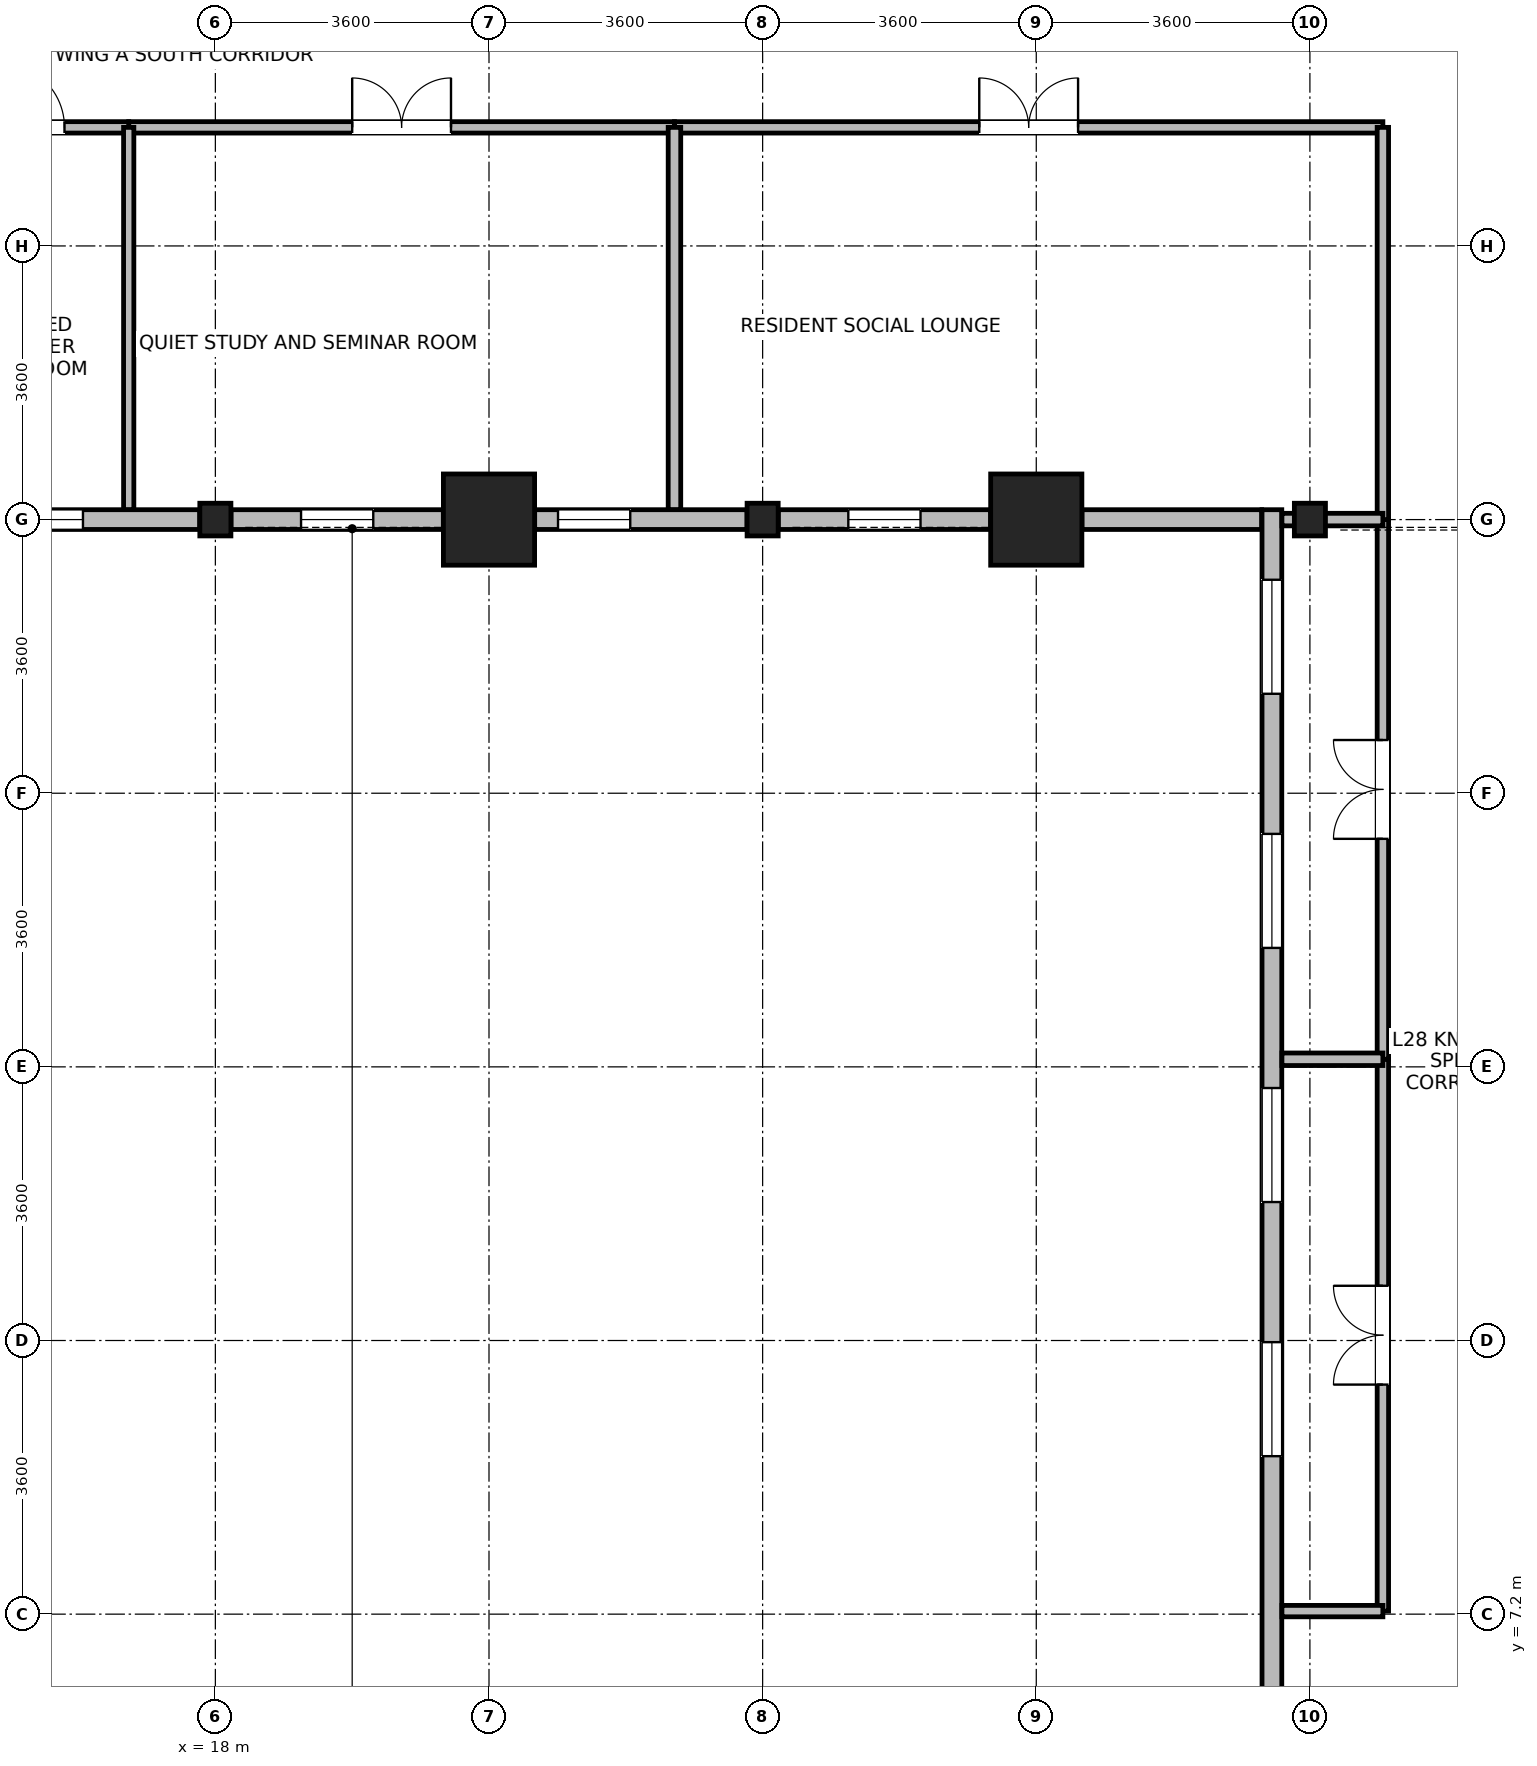
"""IFC4 building model, lengths in metres.
Left out: names, types, materials, properties, quantities, classifications, styles, units other than length and angle.
Written with IfcOpenShell. Run it as: python <this file> out.ifc"""

import sys

from ifc_helpers import new_model, si_unit, direction, frame, frame_2d, origin, origin_2d, place, context, subcontext, project, spatial, rectangle, i_section, extrude, source, transform, mapped, element, fill, save


model = new_model("IFC4")
c1 = context("Model", 3, precision=1e-05, world=origin(), true_north=direction((0.0, 1.0)))
c2 = subcontext(c1, "Body", "Model", "MODEL_VIEW")
j1 = project(units=[si_unit("LENGTHUNIT", "METRE"), si_unit("PLANEANGLEUNIT", "RADIAN")], contexts=[c1])
p1 = place(None, origin())
s1 = spatial("IfcSite", under=j1, at=p1, CompositionType="ELEMENT")
p2 = place(p1, origin())
s2 = spatial("IfcBuilding", under=s1, at=p2, CompositionType="ELEMENT")
p3 = place(p2, frame((0.0, 0.0, 111.9)))
s3 = spatial("IfcBuildingStorey", under=s2, at=p3, CompositionType="ELEMENT", Elevation=111.9)
m1 = source(origin(), c2, "Body", "SweptSolid", [
    extrude(rectangle(XDim=1.2, YDim=1.2, at=origin_2d()), origin(), (0.0, 0.0, 1.0), 3.7),
])
for number, where, z_axis, x_axis in (
    (1, (21.6, 21.6, 0.0), (0.0, 0.0, 1.0), (1.0, 0.0, 0.0)),
    (2, (28.8, 21.6, 0.0), (0.0, 0.0, 1.0), (1.0, 0.0, 0.0)),
):
    element("IfcColumn", number, at=place(p3, frame(where, z_axis=z_axis, x_axis=x_axis)), inside=s3, PredefinedType="COLUMN", context=c2, shape_type="MappedRepresentation", body=[
        mapped(m1, transform((0.0, 0.0, 0.0), x_axis=(1.0, 0.0, 0.0), y_axis=(0.0, 1.0, 0.0), z_axis=(0.0, 0.0, 1.0), scale=1.0)),
    ])
m2 = source(origin(), c2, "Body", "SweptSolid", [
    extrude(i_section(OverallWidth=0.409, OverallDepth=0.43, WebThickness=0.024, FlangeThickness=0.033, FilletRadius=0.015, at=origin_2d()), origin(), (0.0, 0.0, 1.0), 3.7),
])
for number, where, z_axis, x_axis in (
    (3, (18.0, 21.6, 0.0), (0.0, 0.0, 1.0), (1.0, 0.0, 0.0)),
    (4, (25.2, 21.6, 0.0), (0.0, 0.0, 1.0), (1.0, 0.0, 0.0)),
    (5, (32.4, 21.6, 0.0), (0.0, 0.0, 1.0), (1.0, 0.0, 0.0)),
):
    element("IfcColumn", number, at=place(p3, frame(where, z_axis=z_axis, x_axis=x_axis)), inside=s3, PredefinedType="COLUMN", context=c2, shape_type="MappedRepresentation", body=[
        mapped(m2, transform((0.0, 0.0, 0.0), x_axis=(1.0, 0.0, 0.0), y_axis=(0.0, 1.0, 0.0), z_axis=(0.0, 0.0, 1.0), scale=1.0)),
    ])
p4 = place(p3, frame((17.794, 21.6, 0.0), z_axis=(0.0, 0.0, 1.0), x_axis=(-1.0, 0.0, 0.0)))
e6 = element("IfcWall", 6, at=p4, inside=s3, PredefinedType="STANDARD", context=c2, shape_type="SweptSolid", body=[
    extrude(rectangle(XDim=2.793, YDim=0.26, at=frame_2d((1.397, 0.0))), origin(), (0.0, 0.0, 1.0), 2.98),
])
p5 = place(p4, frame((1.536, 0.0, 0.85)))
e7 = element("IfcOpeningElement", 7, at=p5, cuts=e6, PredefinedType="OPENING", context=c2, shape_type="SweptSolid", body=[
    extrude(rectangle(XDim=0.95, YDim=1.75, at=frame_2d((0.475, 0.875))), frame((0.0, 0.14, 0.0), z_axis=(0.0, -1.0, 0.0), x_axis=(1.0, 0.0, 0.0)), (0.0, 0.0, 1.0), 0.28),
])
p6 = place(p3, frame((20.999, 21.6, 0.0), z_axis=(0.0, 0.0, 1.0), x_axis=(-1.0, 0.0, 0.0)))
e8 = element("IfcWall", 8, at=p6, inside=s3, PredefinedType="STANDARD", context=c2, shape_type="SweptSolid", body=[
    extrude(rectangle(XDim=2.793, YDim=0.26, at=frame_2d((1.397, 0.0))), origin(), (0.0, 0.0, 1.0), 2.98),
])
p7 = place(p6, frame((0.922, 0.0, 0.85)))
e9 = element("IfcOpeningElement", 9, at=p7, cuts=e8, PredefinedType="OPENING", context=c2, shape_type="SweptSolid", body=[
    extrude(rectangle(XDim=0.95, YDim=1.75, at=frame_2d((0.475, 0.875))), frame((0.0, 0.14, 0.0), z_axis=(0.0, -1.0, 0.0), x_axis=(1.0, 0.0, 0.0)), (0.0, 0.0, 1.0), 0.28),
])
p8 = place(p3, frame((24.994, 21.6, 0.0), z_axis=(0.0, 0.0, 1.0), x_axis=(-1.0, 0.0, 0.0)))
e10 = element("IfcWall", 10, at=p8, inside=s3, PredefinedType="STANDARD", context=c2, shape_type="SweptSolid", body=[
    extrude(rectangle(XDim=2.793, YDim=0.26, at=frame_2d((1.397, 0.0))), origin(), (0.0, 0.0, 1.0), 2.98),
])
p9 = place(p8, frame((1.536, 0.0, 0.85)))
e11 = element("IfcOpeningElement", 11, at=p9, cuts=e10, PredefinedType="OPENING", context=c2, shape_type="SweptSolid", body=[
    extrude(rectangle(XDim=0.95, YDim=1.75, at=frame_2d((0.475, 0.875))), frame((0.0, 0.14, 0.0), z_axis=(0.0, -1.0, 0.0), x_axis=(1.0, 0.0, 0.0)), (0.0, 0.0, 1.0), 0.28),
])
p10 = place(p3, frame((28.199, 21.6, 0.0), z_axis=(0.0, 0.0, 1.0), x_axis=(-1.0, 0.0, 0.0)))
e12 = element("IfcWall", 12, at=p10, inside=s3, PredefinedType="STANDARD", context=c2, shape_type="SweptSolid", body=[
    extrude(rectangle(XDim=2.793, YDim=0.26, at=frame_2d((1.397, 0.0))), origin(), (0.0, 0.0, 1.0), 2.98),
])
p11 = place(p10, frame((0.922, 0.0, 0.85)))
e13 = element("IfcOpeningElement", 13, at=p11, cuts=e12, PredefinedType="OPENING", context=c2, shape_type="SweptSolid", body=[
    extrude(rectangle(XDim=0.95, YDim=1.75, at=frame_2d((0.475, 0.875))), frame((0.0, 0.14, 0.0), z_axis=(0.0, -1.0, 0.0), x_axis=(1.0, 0.0, 0.0)), (0.0, 0.0, 1.0), 0.28),
])
p12 = place(p3, frame((31.765, 21.6, 0.0), z_axis=(0.0, 0.0, 1.0), x_axis=(-1.0, 0.0, 0.0)))
e14 = element("IfcWall", 14, at=p12, inside=s3, PredefinedType="STANDARD", context=c2, shape_type="SweptSolid", body=[
    extrude(rectangle(XDim=2.364, YDim=0.26, at=frame_2d((1.182, 0.0))), origin(), (0.0, 0.0, 1.0), 2.98),
])
p13 = place(p3, frame((31.9, 1.67, 0.0), z_axis=(0.0, 0.0, 1.0), x_axis=(0.0, 1.0, 0.0)))
e15 = element("IfcWall", 15, at=p13, inside=s3, PredefinedType="STANDARD", context=c2, shape_type="SweptSolid", body=[
    extrude(rectangle(XDim=20.06, YDim=0.26, at=frame_2d((10.03, 0.0))), origin(), (0.0, 0.0, 1.0), 3.43),
])
p14 = place(p13, frame((0.922, 0.0, 0.85)))
e16 = element("IfcOpeningElement", 16, at=p14, cuts=e15, PredefinedType="OPENING", context=c2, shape_type="SweptSolid", body=[
    extrude(rectangle(XDim=1.5, YDim=1.85, at=frame_2d((0.75, 0.925))), frame((0.0, 0.14, 0.0), z_axis=(0.0, -1.0, 0.0), x_axis=(1.0, 0.0, 0.0)), (0.0, 0.0, 1.0), 0.28),
])
p15 = place(p13, frame((7.608, 0.0, 0.85)))
e17 = element("IfcOpeningElement", 17, at=p15, cuts=e15, PredefinedType="OPENING", context=c2, shape_type="SweptSolid", body=[
    extrude(rectangle(XDim=1.5, YDim=1.85, at=frame_2d((0.75, 0.925))), frame((0.0, 0.14, 0.0), z_axis=(0.0, -1.0, 0.0), x_axis=(1.0, 0.0, 0.0)), (0.0, 0.0, 1.0), 0.28),
])
p16 = place(p13, frame((10.952, 0.0, 0.85)))
e18 = element("IfcOpeningElement", 18, at=p16, cuts=e15, PredefinedType="OPENING", context=c2, shape_type="SweptSolid", body=[
    extrude(rectangle(XDim=1.5, YDim=1.85, at=frame_2d((0.75, 0.925))), frame((0.0, 0.14, 0.0), z_axis=(0.0, -1.0, 0.0), x_axis=(1.0, 0.0, 0.0)), (0.0, 0.0, 1.0), 0.28),
])
p17 = place(p13, frame((14.295, 0.0, 0.85)))
e19 = element("IfcOpeningElement", 19, at=p17, cuts=e15, PredefinedType="OPENING", context=c2, shape_type="SweptSolid", body=[
    extrude(rectangle(XDim=1.5, YDim=1.85, at=frame_2d((0.75, 0.925))), frame((0.0, 0.14, 0.0), z_axis=(0.0, -1.0, 0.0), x_axis=(1.0, 0.0, 0.0)), (0.0, 0.0, 1.0), 0.28),
])
p18 = place(p13, frame((17.638, 0.0, 0.85)))
e20 = element("IfcOpeningElement", 20, at=p18, cuts=e15, PredefinedType="OPENING", context=c2, shape_type="SweptSolid", body=[
    extrude(rectangle(XDim=1.5, YDim=1.85, at=frame_2d((0.75, 0.925))), frame((0.0, 0.14, 0.0), z_axis=(0.0, -1.0, 0.0), x_axis=(1.0, 0.0, 0.0)), (0.0, 0.0, 1.0), 0.28),
])
p19 = place(p3, frame((24.04, 26.76, 0.0), z_axis=(0.0, 0.0, 1.0), x_axis=(1.0, 0.0, 0.0)))
e21 = element("IfcWall", 21, at=p19, inside=s3, PredefinedType="PARTITIONING", context=c2, shape_type="SweptSolid", body=[
    extrude(rectangle(XDim=9.32, YDim=0.15, at=frame_2d((4.66, 0.0))), origin(), (0.0, 0.0, 1.0), 3.43),
])
p20 = place(p19, frame((4.01, 0.0, 0.0)))
e22 = element("IfcOpeningElement", 22, at=p20, cuts=e21, PredefinedType="OPENING", context=c2, shape_type="SweptSolid", body=[
    extrude(rectangle(XDim=1.3, YDim=2.12, at=frame_2d((0.65, 1.06))), frame((0.0, 0.085, 0.0), z_axis=(0.0, -1.0, 0.0), x_axis=(1.0, 0.0, 0.0)), (0.0, 0.0, 1.0), 0.17),
])
p21 = place(p3, frame((33.36, 7.24, 0.0), z_axis=(0.0, 0.0, 1.0), x_axis=(0.0, 1.0, 0.0)))
e23 = element("IfcWall", 23, at=p21, inside=s3, PredefinedType="PARTITIONING", context=c2, shape_type="SweptSolid", body=[
    extrude(rectangle(XDim=7.26, YDim=0.15, at=frame_2d((3.63, 0.0))), origin(), (0.0, 0.0, 1.0), 3.43),
])
p22 = place(p21, frame((2.98, 0.0, 0.0)))
e24 = element("IfcOpeningElement", 24, at=p22, cuts=e23, PredefinedType="OPENING", context=c2, shape_type="SweptSolid", body=[
    extrude(rectangle(XDim=1.3, YDim=2.12, at=frame_2d((0.65, 1.06))), frame((0.0, 0.085, 0.0), z_axis=(0.0, -1.0, 0.0), x_axis=(1.0, 0.0, 0.0)), (0.0, 0.0, 1.0), 0.17),
])
p23 = place(p3, frame((16.86, 26.76, 0.0), z_axis=(0.0, 0.0, 1.0), x_axis=(1.0, 0.0, 0.0)))
e25 = element("IfcWall", 25, at=p23, inside=s3, PredefinedType="PARTITIONING", context=c2, shape_type="SweptSolid", body=[
    extrude(rectangle(XDim=7.18, YDim=0.15, at=frame_2d((3.59, 0.0))), origin(), (0.0, 0.0, 1.0), 3.43),
])
p24 = place(p23, frame((2.94, 0.0, 0.0)))
e26 = element("IfcOpeningElement", 26, at=p24, cuts=e25, PredefinedType="OPENING", context=c2, shape_type="SweptSolid", body=[
    extrude(rectangle(XDim=1.3, YDim=2.12, at=frame_2d((0.65, 1.06))), frame((0.0, 0.085, 0.0), z_axis=(0.0, -1.0, 0.0), x_axis=(1.0, 0.0, 0.0)), (0.0, 0.0, 1.0), 0.17),
])
p25 = place(p3, frame((33.36, 14.5, 0.0), z_axis=(0.0, 0.0, 1.0), x_axis=(0.0, 1.0, 0.0)))
e27 = element("IfcWall", 27, at=p25, inside=s3, PredefinedType="PARTITIONING", context=c2, shape_type="SweptSolid", body=[
    extrude(rectangle(XDim=7.1, YDim=0.15, at=frame_2d((3.55, 0.0))), origin(), (0.0, 0.0, 1.0), 3.43),
])
p26 = place(p25, frame((2.9, 0.0, 0.0)))
e28 = element("IfcOpeningElement", 28, at=p26, cuts=e27, PredefinedType="OPENING", context=c2, shape_type="SweptSolid", body=[
    extrude(rectangle(XDim=1.3, YDim=2.12, at=frame_2d((0.65, 1.06))), frame((0.0, 0.085, 0.0), z_axis=(0.0, -1.0, 0.0), x_axis=(1.0, 0.0, 0.0)), (0.0, 0.0, 1.0), 0.17),
])
p27 = place(p3, frame((33.36, 21.6, 0.0), z_axis=(0.0, 0.0, 1.0), x_axis=(0.0, 1.0, 0.0)))
e29 = element("IfcWall", 29, at=p27, inside=s3, PredefinedType="PARTITIONING", context=c2, shape_type="SweptSolid", body=[
    extrude(rectangle(XDim=5.16, YDim=0.15, at=frame_2d((2.58, 0.0))), origin(), (0.0, 0.0, 1.0), 3.43),
])
p28 = place(p3, frame((14.32, 26.76, 0.0), z_axis=(0.0, 0.0, 1.0), x_axis=(1.0, 0.0, 0.0)))
e30 = element("IfcWall", 30, at=p28, inside=s3, PredefinedType="PARTITIONING", context=c2, shape_type="SweptSolid", body=[
    extrude(rectangle(XDim=2.54, YDim=0.15, at=frame_2d((1.27, 0.0))), origin(), (0.0, 0.0, 1.0), 3.43),
])
p29 = place(p28, frame((0.845, 0.0, 0.0)))
e31 = element("IfcOpeningElement", 31, at=p29, cuts=e30, PredefinedType="OPENING", context=c2, shape_type="SweptSolid", body=[
    extrude(rectangle(XDim=0.85, YDim=2.04, at=frame_2d((0.425, 1.02))), frame((0.0, 0.085, 0.0), z_axis=(0.0, -1.0, 0.0), x_axis=(1.0, 0.0, 0.0)), (0.0, 0.0, 1.0), 0.17),
])
p30 = place(p3, frame((32.032, 7.24, 0.0), z_axis=(0.0, 0.0, 1.0), x_axis=(1.0, 0.0, 0.0)))
e32 = element("IfcWall", 32, at=p30, inside=s3, PredefinedType="PARTITIONING", context=c2, shape_type="SweptSolid", body=[
    extrude(rectangle(XDim=1.328, YDim=0.15, at=frame_2d((0.664, 0.0))), origin(), (0.0, 0.0, 1.0), 3.43),
])
p31 = place(p3, frame((16.86, 21.732, 0.0), z_axis=(0.0, 0.0, 1.0), x_axis=(0.0, 1.0, 0.0)))
e33 = element("IfcWall", 33, at=p31, inside=s3, PredefinedType="PARTITIONING", context=c2, shape_type="SweptSolid", body=[
    extrude(rectangle(XDim=5.028, YDim=0.135, at=frame_2d((2.514, 0.0))), origin(), (0.0, 0.0, 1.0), 3.43),
])
p32 = place(p3, frame((24.04, 21.732, 0.0), z_axis=(0.0, 0.0, 1.0), x_axis=(0.0, 1.0, 0.0)))
e34 = element("IfcWall", 34, at=p32, inside=s3, PredefinedType="PARTITIONING", context=c2, shape_type="SweptSolid", body=[
    extrude(rectangle(XDim=5.028, YDim=0.165, at=frame_2d((2.514, 0.0))), origin(), (0.0, 0.0, 1.0), 3.43),
])
p33 = place(p3, frame((32.032, 14.5, 0.0), z_axis=(0.0, 0.0, 1.0), x_axis=(1.0, 0.0, 0.0)))
e35 = element("IfcWall", 35, at=p33, inside=s3, PredefinedType="PARTITIONING", context=c2, shape_type="SweptSolid", body=[
    extrude(rectangle(XDim=1.328, YDim=0.165, at=frame_2d((0.664, 0.0))), origin(), (0.0, 0.0, 1.0), 3.43),
])
p34 = place(p3, frame((32.032, 21.6, 0.0), z_axis=(0.0, 0.0, 1.0), x_axis=(1.0, 0.0, 0.0)))
e36 = element("IfcWall", 36, at=p34, inside=s3, PredefinedType="PARTITIONING", context=c2, shape_type="SweptSolid", body=[
    extrude(rectangle(XDim=1.328, YDim=0.165, at=frame_2d((0.664, 0.0))), origin(), (0.0, 0.0, 1.0), 2.98),
])
p35 = place(p5, origin())
e37 = element("IfcWindow", 37, at=p35, inside=s3, PartitioningType="SINGLE_PANEL", PredefinedType="WINDOW", context=c2, shape_type="SweptSolid", body=[
    extrude(rectangle(XDim=0.95, YDim=1.75, at=frame_2d((0.475, 0.875))), frame((0.0, 0.03, 0.0), z_axis=(0.0, -1.0, 0.0), x_axis=(1.0, 0.0, 0.0)), (0.0, 0.0, 1.0), 0.06),
])
fill(e7, e37)
p36 = place(p7, origin())
e38 = element("IfcWindow", 38, at=p36, inside=s3, PartitioningType="SINGLE_PANEL", PredefinedType="WINDOW", context=c2, shape_type="SweptSolid", body=[
    extrude(rectangle(XDim=0.95, YDim=1.75, at=frame_2d((0.475, 0.875))), frame((0.0, 0.03, 0.0), z_axis=(0.0, -1.0, 0.0), x_axis=(1.0, 0.0, 0.0)), (0.0, 0.0, 1.0), 0.06),
])
fill(e9, e38)
p37 = place(p9, origin())
e39 = element("IfcWindow", 39, at=p37, inside=s3, PartitioningType="SINGLE_PANEL", PredefinedType="WINDOW", context=c2, shape_type="SweptSolid", body=[
    extrude(rectangle(XDim=0.95, YDim=1.75, at=frame_2d((0.475, 0.875))), frame((0.0, 0.03, 0.0), z_axis=(0.0, -1.0, 0.0), x_axis=(1.0, 0.0, 0.0)), (0.0, 0.0, 1.0), 0.06),
])
fill(e11, e39)
p38 = place(p11, origin())
e40 = element("IfcWindow", 40, at=p38, inside=s3, PartitioningType="SINGLE_PANEL", PredefinedType="WINDOW", context=c2, shape_type="SweptSolid", body=[
    extrude(rectangle(XDim=0.95, YDim=1.75, at=frame_2d((0.475, 0.875))), frame((0.0, 0.03, 0.0), z_axis=(0.0, -1.0, 0.0), x_axis=(1.0, 0.0, 0.0)), (0.0, 0.0, 1.0), 0.06),
])
fill(e13, e40)
p39 = place(p15, origin())
e41 = element("IfcWindow", 41, at=p39, inside=s3, PartitioningType="SINGLE_PANEL", PredefinedType="WINDOW", context=c2, shape_type="SweptSolid", body=[
    extrude(rectangle(XDim=1.5, YDim=1.85, at=frame_2d((0.75, 0.925))), frame((0.0, 0.03, 0.0), z_axis=(0.0, -1.0, 0.0), x_axis=(1.0, 0.0, 0.0)), (0.0, 0.0, 1.0), 0.06),
])
fill(e17, e41)
p40 = place(p16, origin())
e42 = element("IfcWindow", 42, at=p40, inside=s3, PartitioningType="SINGLE_PANEL", PredefinedType="WINDOW", context=c2, shape_type="SweptSolid", body=[
    extrude(rectangle(XDim=1.5, YDim=1.85, at=frame_2d((0.75, 0.925))), frame((0.0, 0.03, 0.0), z_axis=(0.0, -1.0, 0.0), x_axis=(1.0, 0.0, 0.0)), (0.0, 0.0, 1.0), 0.06),
])
fill(e18, e42)
p41 = place(p17, origin())
e43 = element("IfcWindow", 43, at=p41, inside=s3, PartitioningType="SINGLE_PANEL", PredefinedType="WINDOW", context=c2, shape_type="SweptSolid", body=[
    extrude(rectangle(XDim=1.5, YDim=1.85, at=frame_2d((0.75, 0.925))), frame((0.0, 0.03, 0.0), z_axis=(0.0, -1.0, 0.0), x_axis=(1.0, 0.0, 0.0)), (0.0, 0.0, 1.0), 0.06),
])
fill(e19, e43)
p42 = place(p18, origin())
e44 = element("IfcWindow", 44, at=p42, inside=s3, PartitioningType="SINGLE_PANEL", PredefinedType="WINDOW", context=c2, shape_type="SweptSolid", body=[
    extrude(rectangle(XDim=1.5, YDim=1.85, at=frame_2d((0.75, 0.925))), frame((0.0, 0.03, 0.0), z_axis=(0.0, -1.0, 0.0), x_axis=(1.0, 0.0, 0.0)), (0.0, 0.0, 1.0), 0.06),
])
fill(e20, e44)
p43 = place(p20, origin())
e45 = element("IfcDoor", 45, at=p43, inside=s3, OperationType="DOUBLE_DOOR_SINGLE_SWING", PredefinedType="DOOR", context=c2, shape_type="SweptSolid", body=[
    extrude(rectangle(XDim=1.3, YDim=2.12, at=frame_2d((0.65, 1.06))), frame((0.0, 0.025, 0.0), z_axis=(0.0, -1.0, 0.0), x_axis=(1.0, 0.0, 0.0)), (0.0, 0.0, 1.0), 0.05),
])
fill(e22, e45)
p44 = place(p22, origin())
e46 = element("IfcDoor", 46, at=p44, inside=s3, OperationType="DOUBLE_DOOR_SINGLE_SWING", PredefinedType="DOOR", context=c2, shape_type="SweptSolid", body=[
    extrude(rectangle(XDim=1.3, YDim=2.12, at=frame_2d((0.65, 1.06))), frame((0.0, 0.025, 0.0), z_axis=(0.0, -1.0, 0.0), x_axis=(1.0, 0.0, 0.0)), (0.0, 0.0, 1.0), 0.05),
])
fill(e24, e46)
p45 = place(p24, origin())
e47 = element("IfcDoor", 47, at=p45, inside=s3, OperationType="DOUBLE_DOOR_SINGLE_SWING", PredefinedType="DOOR", context=c2, shape_type="SweptSolid", body=[
    extrude(rectangle(XDim=1.3, YDim=2.12, at=frame_2d((0.65, 1.06))), frame((0.0, 0.025, 0.0), z_axis=(0.0, -1.0, 0.0), x_axis=(1.0, 0.0, 0.0)), (0.0, 0.0, 1.0), 0.05),
])
fill(e26, e47)
p46 = place(p26, origin())
e48 = element("IfcDoor", 48, at=p46, inside=s3, OperationType="DOUBLE_DOOR_SINGLE_SWING", PredefinedType="DOOR", context=c2, shape_type="SweptSolid", body=[
    extrude(rectangle(XDim=1.3, YDim=2.12, at=frame_2d((0.65, 1.06))), frame((0.0, 0.025, 0.0), z_axis=(0.0, -1.0, 0.0), x_axis=(1.0, 0.0, 0.0)), (0.0, 0.0, 1.0), 0.05),
])
fill(e28, e48)
p47 = place(p29, origin())
e49 = element("IfcDoor", 49, at=p47, inside=s3, OperationType="SINGLE_SWING_LEFT", PredefinedType="DOOR", context=c2, shape_type="SweptSolid", body=[
    extrude(rectangle(XDim=0.85, YDim=2.04, at=frame_2d((0.425, 1.02))), frame((0.0, 0.025, 0.0), z_axis=(0.0, -1.0, 0.0), x_axis=(1.0, 0.0, 0.0)), (0.0, 0.0, 1.0), 0.05),
])
fill(e31, e49)
save(model, sys.argv[1])
